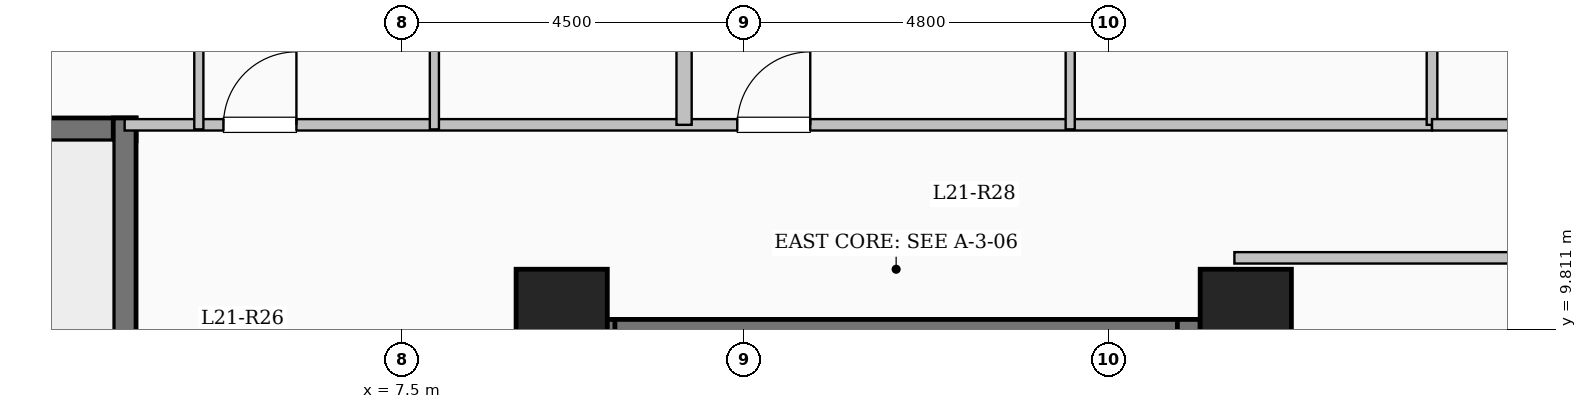
"""IFC4 building model, lengths in metres.
Left out: names, types, materials, properties, quantities, classifications, styles, units other than length and angle.
Written with IfcOpenShell. Run it as: python <this file> out.ifc"""

import sys

from ifc_helpers import new_model, si_unit, direction, frame, frame_2d, origin, origin_2d, place, context, subcontext, project, spatial, rectangle, extrude, element, fill, save


model = new_model("IFC4")
c1 = context("Model", 3, precision=1e-05, world=origin(), true_north=direction((0.0, 1.0)))
c2 = subcontext(c1, "Body", "Model", "MODEL_VIEW")
j1 = project(units=[si_unit("LENGTHUNIT", "METRE"), si_unit("PLANEANGLEUNIT", "RADIAN")], contexts=[c1])
p1 = place(None, origin())
s1 = spatial("IfcSite", under=j1, at=p1, CompositionType="ELEMENT")
p2 = place(p1, origin())
s2 = spatial("IfcBuilding", under=s1, at=p2, CompositionType="ELEMENT")
p3 = place(p2, frame((0.0, 0.0, 81.65)))
s3 = spatial("IfcBuildingStorey", under=s2, at=p3, CompositionType="ELEMENT", Elevation=81.65)
for number, where, z_axis, x_axis in (
    (1, (9.6, 10.0, 0.0), (0.0, 0.0, 1.0), (1.0, 0.0, 0.0)),
    (2, (18.6, 10.0, 0.0), (0.0, 0.0, 1.0), (1.0, 0.0, 0.0)),
):
    element("IfcColumn", number, at=place(p3, frame(where, z_axis=z_axis, x_axis=x_axis)), inside=s3, PredefinedType="COLUMN", context=c2, shape_type="SweptSolid", body=[
        extrude(rectangle(XDim=1.2, YDim=1.2, at=origin_2d()), origin(), (0.0, 0.0, 1.0), 3.35),
    ])
p4 = place(p3, frame((10.0, 9.79, 0.0), z_axis=(0.0, 0.0, 1.0), x_axis=(1.0, 0.0, 0.0)))
e3 = element("IfcWall", 3, at=p4, inside=s3, PredefinedType="SHEAR", context=c2, shape_type="SweptSolid", body=[
    extrude(rectangle(XDim=8.0, YDim=0.3, at=frame_2d((4.0, 0.0))), origin(), (0.0, 0.0, 1.0), 3.35),
])
for number, where, z_axis, x_axis in (
    (4, (10.15, 6.35, 0.0), (0.0, 0.0, 1.0), (0.0, 1.0, 0.0)),
    (5, (17.85, 6.35, 0.0), (0.0, 0.0, 1.0), (0.0, 1.0, 0.0)),
):
    element("IfcWall", number, at=place(p3, frame(where, z_axis=z_axis, x_axis=x_axis)), inside=s3, PredefinedType="SHEAR", context=c2, shape_type="SweptSolid", body=[
        extrude(rectangle(XDim=3.59, YDim=0.3, at=frame_2d((1.795, 0.0))), origin(), (0.0, 0.0, 1.0), 3.35),
    ])
p5 = place(p3, frame((-4.0, 12.44, 0.0), z_axis=(0.0, 0.0, 1.0), x_axis=(1.0, 0.0, 0.0)))
e6 = element("IfcWall", 6, at=p5, inside=s3, PredefinedType="SHEAR", context=c2, shape_type="SweptSolid", body=[
    extrude(rectangle(XDim=8.0, YDim=0.3, at=frame_2d((4.0, 0.0))), origin(), (0.0, 0.0, 1.0), 3.35),
])
p6 = place(p3, frame((3.85, 9.0, 0.0), z_axis=(0.0, 0.0, 1.0), x_axis=(0.0, 1.0, 0.0)))
e7 = element("IfcWall", 7, at=p6, inside=s3, PredefinedType="SHEAR", context=c2, shape_type="SweptSolid", body=[
    extrude(rectangle(XDim=3.59, YDim=0.3, at=frame_2d((1.795, 0.0))), origin(), (0.0, 0.0, 1.0), 3.35),
])
p7 = place(p3, frame((3.85, 12.5, 0.0), z_axis=(0.0, 0.0, 1.0), x_axis=(1.0, 0.0, 0.0)))
e8 = element("IfcWall", 8, at=p7, inside=s3, PredefinedType="PARTITIONING", context=c2, shape_type="SweptSolid", body=[
    extrude(rectangle(XDim=17.2, YDim=0.15, at=frame_2d((8.6, 0.0))), origin(), (0.0, 0.0, 1.0), 3.1),
])
p8 = place(p7, frame((1.3, 0.0, 0.0)))
e9 = element("IfcOpeningElement", 9, at=p8, cuts=e8, PredefinedType="OPENING", context=c2, shape_type="SweptSolid", body=[
    extrude(rectangle(XDim=0.96, YDim=2.15, at=frame_2d((0.48, 1.075))), frame((0.0, 0.085, 0.0), z_axis=(0.0, -1.0, 0.0), x_axis=(1.0, 0.0, 0.0)), (0.0, 0.0, 1.0), 0.17),
])
p9 = place(p7, frame((8.06, 0.0, 0.0)))
e10 = element("IfcOpeningElement", 10, at=p9, cuts=e8, PredefinedType="OPENING", context=c2, shape_type="SweptSolid", body=[
    extrude(rectangle(XDim=0.96, YDim=2.15, at=frame_2d((0.48, 1.075))), frame((0.0, 0.085, 0.0), z_axis=(0.0, -1.0, 0.0), x_axis=(1.0, 0.0, 0.0)), (0.0, 0.0, 1.0), 0.17),
])
p10 = place(p3, frame((11.21, 12.5, 0.0), z_axis=(0.0, 0.0, 1.0), x_axis=(0.0, 1.0, 0.0)))
e11 = element("IfcWall", 11, at=p10, inside=s3, PredefinedType="SOLIDWALL", context=c2, shape_type="SweptSolid", body=[
    extrude(rectangle(XDim=9.6, YDim=0.2, at=frame_2d((4.8, 0.0))), origin(), (0.0, 0.0, 1.0), 3.1),
])
p11 = place(p3, frame((4.826, 12.44, 0.0), z_axis=(0.0, 0.0, 1.0), x_axis=(0.0, 1.0, 0.0)))
e12 = element("IfcWall", 12, at=p11, inside=s3, PredefinedType="PARTITIONING", context=c2, shape_type="SweptSolid", body=[
    extrude(rectangle(XDim=11.14, YDim=0.12, at=frame_2d((5.57, 0.0))), origin(), (0.0, 0.0, 1.0), 3.1),
])
p12 = place(p11, frame((3.245, 0.0, 0.0)))
e13 = element("IfcOpeningElement", 13, at=p12, cuts=e12, PredefinedType="OPENING", context=c2, shape_type="SweptSolid", body=[
    extrude(rectangle(XDim=1.08, YDim=2.15, at=frame_2d((0.54, 1.075))), frame((0.0, 0.07, 0.0), z_axis=(0.0, -1.0, 0.0), x_axis=(1.0, 0.0, 0.0)), (0.0, 0.0, 1.0), 0.14),
])
p13 = place(p3, frame((7.925, 12.44, 0.0), z_axis=(0.0, 0.0, 1.0), x_axis=(0.0, 1.0, 0.0)))
e14 = element("IfcWall", 14, at=p13, inside=s3, PredefinedType="PARTITIONING", context=c2, shape_type="SweptSolid", body=[
    extrude(rectangle(XDim=2.96, YDim=0.12, at=frame_2d((1.48, 0.0))), origin(), (0.0, 0.0, 1.0), 2.435),
])
p14 = place(p3, frame((16.29, 12.44, 0.0), z_axis=(0.0, 0.0, 1.0), x_axis=(0.0, 1.0, 0.0)))
e15 = element("IfcWall", 15, at=p14, inside=s3, PredefinedType="PARTITIONING", context=c2, shape_type="SweptSolid", body=[
    extrude(rectangle(XDim=3.21, YDim=0.12, at=frame_2d((1.605, 0.0))), origin(), (0.0, 0.0, 1.0), 3.1),
])
p15 = place(p14, frame((1.195, 0.0, 0.0)))
e16 = element("IfcOpeningElement", 16, at=p15, cuts=e15, PredefinedType="OPENING", context=c2, shape_type="SweptSolid", body=[
    extrude(rectangle(XDim=0.88, YDim=2.1, at=frame_2d((0.44, 1.05))), frame((0.0, 0.07, 0.0), z_axis=(0.0, -1.0, 0.0), x_axis=(1.0, 0.0, 0.0)), (0.0, 0.0, 1.0), 0.14),
])
p16 = place(p3, frame((18.45, 10.75, 0.0), z_axis=(0.0, 0.0, 1.0), x_axis=(1.0, 0.0, 0.0)))
e17 = element("IfcWall", 17, at=p16, inside=s3, PredefinedType="PARTITIONING", context=c2, shape_type="SweptSolid", body=[
    extrude(rectangle(XDim=8.43, YDim=0.15, at=frame_2d((4.215, 0.0))), origin(), (0.0, 0.0, 1.0), 3.1),
])
p17 = place(p3, frame((21.05, 12.5, 0.0), z_axis=(0.0, 0.0, 1.0), x_axis=(0.0, 1.0, 0.0)))
e18 = element("IfcWall", 18, at=p17, inside=s3, PredefinedType="PARTITIONING", context=c2, shape_type="SweptSolid", body=[
    extrude(rectangle(XDim=5.35, YDim=0.14, at=frame_2d((2.675, 0.0))), origin(), (0.0, 0.0, 1.0), 3.1),
])
p18 = place(p3, frame((21.05, 12.5, 0.0), z_axis=(0.0, 0.0, 1.0), x_axis=(1.0, 0.0, 0.0)))
e19 = element("IfcWall", 19, at=p18, inside=s3, PredefinedType="PARTITIONING", context=c2, shape_type="SweptSolid", body=[
    extrude(rectangle(XDim=5.83, YDim=0.15, at=frame_2d((2.915, 0.0))), origin(), (0.0, 0.0, 1.0), 3.1),
])
p19 = place(p18, frame((2.44, 0.0, 0.0)))
e20 = element("IfcOpeningElement", 20, at=p19, cuts=e19, PredefinedType="OPENING", context=c2, shape_type="SweptSolid", body=[
    extrude(rectangle(XDim=0.95, YDim=2.15, at=frame_2d((0.475, 1.075))), frame((0.0, 0.085, 0.0), z_axis=(0.0, -1.0, 0.0), x_axis=(1.0, 0.0, 0.0)), (0.0, 0.0, 1.0), 0.17),
])
p20 = place(p8, origin())
e21 = element("IfcDoor", 21, at=p20, inside=s3, OperationType="SINGLE_SWING_RIGHT", PredefinedType="DOOR", context=c2, shape_type="SweptSolid", body=[
    extrude(rectangle(XDim=0.96, YDim=2.15, at=frame_2d((0.48, 1.075))), frame((0.0, 0.025, 0.0), z_axis=(0.0, -1.0, 0.0), x_axis=(1.0, 0.0, 0.0)), (0.0, 0.0, 1.0), 0.05),
])
fill(e9, e21)
p21 = place(p9, origin())
e22 = element("IfcDoor", 22, at=p21, inside=s3, OperationType="SINGLE_SWING_RIGHT", PredefinedType="DOOR", context=c2, shape_type="SweptSolid", body=[
    extrude(rectangle(XDim=0.96, YDim=2.15, at=frame_2d((0.48, 1.075))), frame((0.0, 0.025, 0.0), z_axis=(0.0, -1.0, 0.0), x_axis=(1.0, 0.0, 0.0)), (0.0, 0.0, 1.0), 0.05),
])
fill(e10, e22)
save(model, sys.argv[1])
